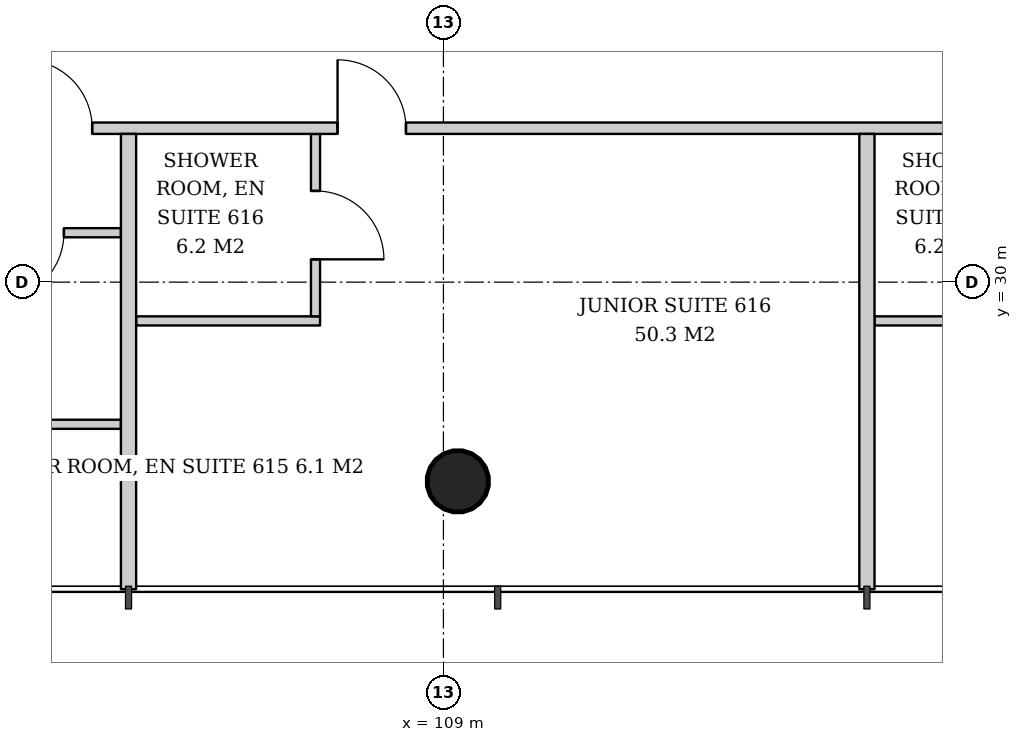
"""IFC4 building model, lengths in metres.
Left out: names, types, materials, properties, quantities, classifications, styles, units other than length and angle.
Written with IfcOpenShell. Run it as: python <this file> out.ifc"""

import sys

from ifc_helpers import new_model, si_unit, direction, frame, frame_2d, origin, origin_2d, place, context, subcontext, project, spatial, rectangle, hollow_circle, extrude, element, fill, save


model = new_model("IFC4")
c1 = context("Model", 3, precision=1e-05, world=origin(), true_north=direction((0.0, 1.0)))
c2 = subcontext(c1, "Body", "Model", "MODEL_VIEW")
j1 = project(units=[si_unit("LENGTHUNIT", "METRE"), si_unit("PLANEANGLEUNIT", "RADIAN")], contexts=[c1])
p1 = place(None, origin())
s1 = spatial("IfcSite", under=j1, at=p1, CompositionType="ELEMENT")
p2 = place(p1, origin())
s2 = spatial("IfcBuilding", under=s1, at=p2, CompositionType="ELEMENT")
p3 = place(p2, frame((0.0, 0.0, 28.6)))
s3 = spatial("IfcBuildingStorey", under=s2, at=p3, CompositionType="ELEMENT", Elevation=28.6)
p4 = place(p3, frame((109.164, 27.328, 0.0), z_axis=(0.02149908433, 0.04306234503, 0.998841040313), x_axis=(-0.894693706707, 0.446680166538, 0.0)))
e1 = element("IfcColumn", 1, at=p4, inside=s3, PredefinedType="COLUMN", context=c2, shape_type="SweptSolid", body=[
    extrude(hollow_circle(Radius=0.406, WallThickness=0.03, at=origin_2d()), origin(), (0.0, 0.0, 1.0), 3.804),
])
p5 = place(p3, frame((104.757, 30.65, 0.0), z_axis=(0.0, 0.0, 1.0), x_axis=(-1.0, 0.0, 0.0)))
e2 = element("IfcWall", 2, at=p5, inside=s3, PredefinedType="PARTITIONING", context=c2, shape_type="SweptSolid", body=[
    extrude(rectangle(XDim=2.057, YDim=0.12, at=frame_2d((1.029, 0.0))), origin(), (0.0, 0.0, 1.0), 3.6),
])
p6 = place(p5, frame((0.75, 0.0, 0.0)))
e3 = element("IfcOpeningElement", 3, at=p6, cuts=e2, PredefinedType="OPENING", context=c2, shape_type="SweptSolid", body=[
    extrude(rectangle(XDim=0.9, YDim=2.1, at=frame_2d((0.45, 1.05))), frame((0.0, 0.07, 0.0), z_axis=(0.0, -1.0, 0.0), x_axis=(1.0, 0.0, 0.0)), (0.0, 0.0, 1.0), 0.14),
])
p7 = place(p3, frame((104.757, 28.13, 0.0), z_axis=(0.0, 0.0, 1.0), x_axis=(-1.0, 0.0, 0.0)))
e4 = element("IfcWall", 4, at=p7, inside=s3, PredefinedType="PARTITIONING", context=c2, shape_type="SweptSolid", body=[
    extrude(rectangle(XDim=2.58, YDim=0.12, at=frame_2d((1.29, 0.0))), origin(), (0.0, 0.0, 1.0), 3.6),
])
p8 = place(p3, frame((104.957, 29.49, 0.0), z_axis=(0.0, 0.0, 1.0), x_axis=(1.0, 0.0, 0.0)))
e5 = element("IfcWall", 5, at=p8, inside=s3, PredefinedType="PARTITIONING", context=c2, shape_type="SweptSolid", body=[
    extrude(rectangle(XDim=2.42, YDim=0.12, at=frame_2d((1.21, 0.0))), origin(), (0.0, 0.0, 1.0), 3.6),
])
p9 = place(p3, frame((107.317, 31.95, 0.0), z_axis=(0.0, 0.0, 1.0), x_axis=(0.0, -1.0, 0.0)))
e6 = element("IfcWall", 6, at=p9, inside=s3, PredefinedType="PARTITIONING", context=c2, shape_type="SweptSolid", body=[
    extrude(rectangle(XDim=2.4, YDim=0.12, at=frame_2d((1.2, 0.0))), origin(), (0.0, 0.0, 1.0), 2.847),
])
p10 = place(p9, frame((0.75, 0.0, 0.0)))
e7 = element("IfcOpeningElement", 7, at=p10, cuts=e6, PredefinedType="OPENING", context=c2, shape_type="SweptSolid", body=[
    extrude(rectangle(XDim=0.9, YDim=2.1, at=frame_2d((0.45, 1.05))), frame((0.0, 0.07, 0.0), z_axis=(0.0, -1.0, 0.0), x_axis=(1.0, 0.0, 0.0)), (0.0, 0.0, 1.0), 0.14),
])
p11 = place(p3, frame((114.671, 29.49, 0.0), z_axis=(0.0, 0.0, 1.0), x_axis=(1.0, 0.0, 0.0)))
e8 = element("IfcWall", 8, at=p11, inside=s3, PredefinedType="PARTITIONING", context=c2, shape_type="SweptSolid", body=[
    extrude(rectangle(XDim=2.42, YDim=0.12, at=frame_2d((1.21, 0.0))), origin(), (0.0, 0.0, 1.0), 2.847),
])
p12 = place(p3, frame((102.95, 32.025, 0.0), z_axis=(0.0, 0.0, 1.0), x_axis=(1.0, 0.0, 0.0)))
e9 = element("IfcWall", 9, at=p12, inside=s3, PredefinedType="PARTITIONING", context=c2, shape_type="SweptSolid", body=[
    extrude(rectangle(XDim=27.95, YDim=0.15, at=frame_2d((13.975, 0.0))), origin(), (0.0, 0.0, 1.0), 2.8),
])
p13 = place(p12, frame((0.529, 0.0, 0.0)))
e10 = element("IfcOpeningElement", 10, at=p13, cuts=e9, PredefinedType="OPENING", context=c2, shape_type="SweptSolid", body=[
    extrude(rectangle(XDim=0.9, YDim=2.1, at=frame_2d((0.45, 1.05))), frame((0.0, 0.085, 0.0), z_axis=(0.0, -1.0, 0.0), x_axis=(1.0, 0.0, 0.0)), (0.0, 0.0, 1.0), 0.17),
])
p14 = place(p12, frame((4.657, 0.0, 0.0)))
e11 = element("IfcOpeningElement", 11, at=p14, cuts=e9, PredefinedType="OPENING", context=c2, shape_type="SweptSolid", body=[
    extrude(rectangle(XDim=0.9, YDim=2.1, at=frame_2d((0.45, 1.05))), frame((0.0, 0.085, 0.0), z_axis=(0.0, -1.0, 0.0), x_axis=(1.0, 0.0, 0.0)), (0.0, 0.0, 1.0), 0.17),
])
p15 = place(p12, frame((14.371, 0.0, 0.0)))
e12 = element("IfcOpeningElement", 12, at=p15, cuts=e9, PredefinedType="OPENING", context=c2, shape_type="SweptSolid", body=[
    extrude(rectangle(XDim=0.9, YDim=2.1, at=frame_2d((0.45, 1.05))), frame((0.0, 0.085, 0.0), z_axis=(0.0, -1.0, 0.0), x_axis=(1.0, 0.0, 0.0)), (0.0, 0.0, 1.0), 0.17),
])
p16 = place(p12, frame((17.686, 0.0, 0.0)))
e13 = element("IfcOpeningElement", 13, at=p16, cuts=e9, PredefinedType="OPENING", context=c2, shape_type="SweptSolid", body=[
    extrude(rectangle(XDim=0.9, YDim=2.1, at=frame_2d((0.45, 1.05))), frame((0.0, 0.085, 0.0), z_axis=(0.0, -1.0, 0.0), x_axis=(1.0, 0.0, 0.0)), (0.0, 0.0, 1.0), 0.17),
])
p17 = place(p12, frame((24.086, 0.0, 0.0)))
e14 = element("IfcOpeningElement", 14, at=p17, cuts=e9, PredefinedType="OPENING", context=c2, shape_type="SweptSolid", body=[
    extrude(rectangle(XDim=0.9, YDim=2.1, at=frame_2d((0.45, 1.05))), frame((0.0, 0.085, 0.0), z_axis=(0.0, -1.0, 0.0), x_axis=(1.0, 0.0, 0.0)), (0.0, 0.0, 1.0), 0.17),
])
p18 = place(p3, frame((104.857, 31.95, 0.0), z_axis=(0.0, 0.0, 1.0), x_axis=(0.0, -1.0, 0.0)))
e15 = element("IfcWall", 15, at=p18, inside=s3, PredefinedType="PARTITIONING", context=c2, shape_type="SweptSolid", body=[
    extrude(rectangle(XDim=5.99, YDim=0.2, at=frame_2d((2.995, 0.0))), origin(), (0.0, 0.0, 1.0), 2.847),
])
p19 = place(p3, frame((114.572, 31.95, 0.0), z_axis=(0.0, 0.0, 1.0), x_axis=(0.0, -1.0, 0.0)))
e16 = element("IfcWall", 16, at=p19, inside=s3, PredefinedType="PARTITIONING", context=c2, shape_type="SweptSolid", body=[
    extrude(rectangle(XDim=5.99, YDim=0.2, at=frame_2d((2.995, 0.0))), origin(), (0.0, 0.0, 1.0), 3.05),
])
p20 = place(p6, origin())
e17 = element("IfcDoor", 17, at=p20, inside=s3, OperationType="SINGLE_SWING_RIGHT", PredefinedType="DOOR", context=c2, shape_type="SweptSolid", body=[
    extrude(rectangle(XDim=0.9, YDim=2.1, at=frame_2d((0.45, 1.05))), frame((0.0, 0.025, 0.0), z_axis=(0.0, -1.0, 0.0), x_axis=(1.0, 0.0, 0.0)), (0.0, 0.0, 1.0), 0.05),
])
fill(e3, e17)
p21 = place(p10, origin())
e18 = element("IfcDoor", 18, at=p21, inside=s3, OperationType="SINGLE_SWING_RIGHT", PredefinedType="DOOR", context=c2, shape_type="SweptSolid", body=[
    extrude(rectangle(XDim=0.9, YDim=2.1, at=frame_2d((0.45, 1.05))), frame((0.0, 0.025, 0.0), z_axis=(0.0, -1.0, 0.0), x_axis=(1.0, 0.0, 0.0)), (0.0, 0.0, 1.0), 0.05),
])
fill(e7, e18)
p22 = place(p13, origin())
e19 = element("IfcDoor", 19, at=p22, inside=s3, OperationType="SINGLE_SWING_LEFT", PredefinedType="DOOR", context=c2, shape_type="SweptSolid", body=[
    extrude(rectangle(XDim=0.9, YDim=2.1, at=frame_2d((0.45, 1.05))), frame((0.0, 0.025, 0.0), z_axis=(0.0, -1.0, 0.0), x_axis=(1.0, 0.0, 0.0)), (0.0, 0.0, 1.0), 0.05),
])
fill(e10, e19)
p23 = place(p14, origin())
e20 = element("IfcDoor", 20, at=p23, inside=s3, OperationType="SINGLE_SWING_LEFT", PredefinedType="DOOR", context=c2, shape_type="SweptSolid", body=[
    extrude(rectangle(XDim=0.9, YDim=2.1, at=frame_2d((0.45, 1.05))), frame((0.0, 0.025, 0.0), z_axis=(0.0, -1.0, 0.0), x_axis=(1.0, 0.0, 0.0)), (0.0, 0.0, 1.0), 0.05),
])
fill(e11, e20)
save(model, sys.argv[1])
